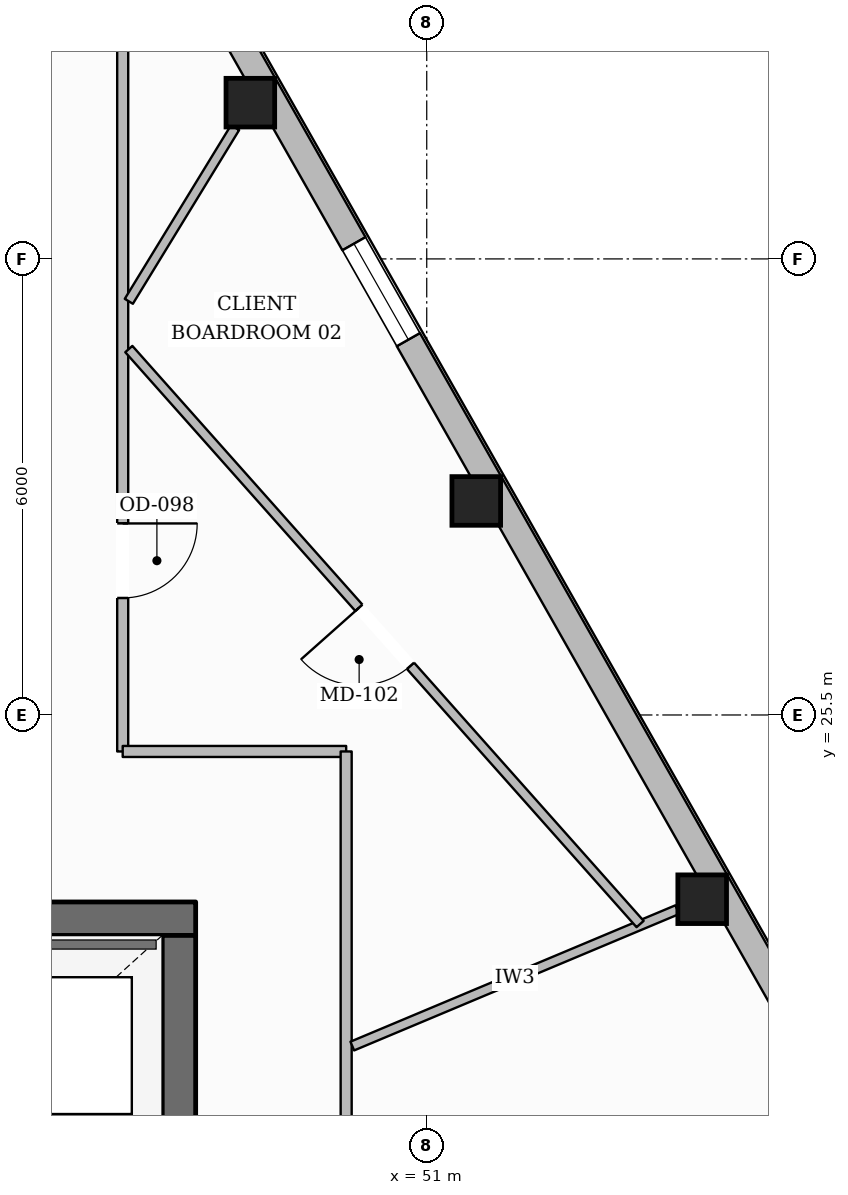
"""IFC4 building model, lengths in metres.
Left out: names, types, materials, properties, quantities, classifications, styles, units other than length and angle.
Written with IfcOpenShell. Run it as: python <this file> out.ifc"""

import sys

from ifc_helpers import new_model, si_unit, direction, frame, frame_2d, origin, origin_2d, place, context, subcontext, project, spatial, rectangle, hollow_rectangle, extrude, element, fill, save


model = new_model("IFC4")
c1 = context("Model", 3, precision=1e-05, world=origin(), true_north=direction((0.0, 1.0)))
c2 = subcontext(c1, "Body", "Model", "MODEL_VIEW")
j1 = project(units=[si_unit("LENGTHUNIT", "METRE"), si_unit("PLANEANGLEUNIT", "RADIAN")], contexts=[c1])
p1 = place(None, origin())
s1 = spatial("IfcSite", under=j1, at=p1, CompositionType="ELEMENT")
p2 = place(p1, origin())
s2 = spatial("IfcBuilding", under=s1, at=p2, CompositionType="ELEMENT")
p3 = place(p2, frame((0.0, 0.0, 165.0)))
s3 = spatial("IfcBuildingStorey", under=s2, at=p3, CompositionType="ELEMENT", Elevation=165.0)
p4 = place(p3, frame((28.04, 22.82, 0.0), z_axis=(0.0, 0.0, 1.0), x_axis=(1.0, 0.0, 0.0)))
e1 = element("IfcWall", 1, at=p4, inside=s3, PredefinedType="SOLIDWALL", context=c2, shape_type="SweptSolid", body=[
    extrude(rectangle(XDim=19.92, YDim=0.44, at=frame_2d((9.96, 0.0))), origin(), (0.0, 0.0, 1.0), 3.6),
])
p5 = place(p4, frame((6.235, 0.0, 0.0)))
e2 = element("IfcOpeningElement", 2, at=p5, cuts=e1, PredefinedType="OPENING", context=c2, shape_type="SweptSolid", body=[
    extrude(rectangle(XDim=1.05, YDim=2.15, at=frame_2d((0.525, 1.075))), frame((0.0, 0.23, 0.0), z_axis=(0.0, -1.0, 0.0), x_axis=(1.0, 0.0, 0.0)), (0.0, 0.0, 1.0), 0.46),
])
p6 = place(p4, frame((12.635, 0.0, 0.0)))
e3 = element("IfcOpeningElement", 3, at=p6, cuts=e1, PredefinedType="OPENING", context=c2, shape_type="SweptSolid", body=[
    extrude(rectangle(XDim=1.05, YDim=2.15, at=frame_2d((0.525, 1.075))), frame((0.0, 0.23, 0.0), z_axis=(0.0, -1.0, 0.0), x_axis=(1.0, 0.0, 0.0)), (0.0, 0.0, 1.0), 0.46),
])
p7 = place(p3, frame((47.74, 9.6, 0.0), z_axis=(0.0, 0.0, 1.0), x_axis=(0.0, 1.0, 0.0)))
e4 = element("IfcWall", 4, at=p7, inside=s3, PredefinedType="SOLIDWALL", context=c2, shape_type="SweptSolid", body=[
    extrude(rectangle(XDim=13.0, YDim=0.44, at=frame_2d((6.5, 0.0))), origin(), (0.0, 0.0, 1.0), 3.6),
])
p8 = place(p7, frame((0.2, 0.0, 0.0)))
e5 = element("IfcOpeningElement", 5, at=p8, cuts=e4, PredefinedType="OPENING", context=c2, shape_type="SweptSolid", body=[
    extrude(rectangle(XDim=1.1, YDim=2.15, at=frame_2d((0.55, 1.075))), frame((0.0, 0.23, 0.0), z_axis=(0.0, -1.0, 0.0), x_axis=(1.0, 0.0, 0.0)), (0.0, 0.0, 1.0), 0.46),
])
p9 = place(p7, frame((8.4, 0.0, 0.0)))
e6 = element("IfcOpeningElement", 6, at=p9, cuts=e4, PredefinedType="OPENING", context=c2, shape_type="SweptSolid", body=[
    extrude(rectangle(XDim=0.9, YDim=2.1, at=frame_2d((0.45, 1.05))), frame((0.0, 0.23, 0.0), z_axis=(0.0, -1.0, 0.0), x_axis=(1.0, 0.0, 0.0)), (0.0, 0.0, 1.0), 0.46),
])
for number, where, z_axis, x_axis in (
    (7, (54.624, 23.076, 0.0), (0.0, 0.0, 1.0), (1.0, 0.0, 0.0)),
    (8, (51.652, 28.316, 0.0), (0.0, 0.0, 1.0), (1.0, 0.0, 0.0)),
    (9, (48.679, 33.556, 0.0), (0.0, 0.0, 1.0), (1.0, 0.0, 0.0)),
):
    element("IfcColumn", number, at=place(p3, frame(where, z_axis=z_axis, x_axis=x_axis)), inside=s3, PredefinedType="COLUMN", context=c2, shape_type="SweptSolid", body=[
        extrude(hollow_rectangle(XDim=0.64, YDim=0.64, WallThickness=0.028, at=origin_2d()), origin(), (0.0, 0.0, 1.0), 3.6),
    ])
p10 = place(p3, frame((42.733, 44.585, 0.0), z_axis=(0.0, 0.0, 1.0), x_axis=(0.493387150796, -0.869809817966, 0.0)))
e10 = element("IfcWall", 10, at=p10, inside=s3, PredefinedType="STANDARD", context=c2, shape_type="SweptSolid", body=[
    extrude(rectangle(XDim=37.096, YDim=0.35, at=frame_2d((18.548, 0.0))), origin(), (0.0, 0.0, 1.0), 3.132),
])
p11 = place(p10, frame((32.886, 0.0, 0.65)))
e11 = element("IfcOpeningElement", 11, at=p11, cuts=e10, PredefinedType="OPENING", context=c2, shape_type="SweptSolid", body=[
    extrude(rectangle(XDim=1.45, YDim=1.75, at=frame_2d((0.725, 0.875))), frame((0.0, 0.185, 0.0), z_axis=(0.0, -1.0, 0.0), x_axis=(1.0, 0.0, 0.0)), (0.0, 0.0, 1.0), 0.37),
])
p12 = place(p10, frame((26.863, 0.0, 0.65)))
e12 = element("IfcOpeningElement", 12, at=p12, cuts=e10, PredefinedType="OPENING", context=c2, shape_type="SweptSolid", body=[
    extrude(rectangle(XDim=1.45, YDim=1.75, at=frame_2d((0.725, 0.875))), frame((0.0, 0.185, 0.0), z_axis=(0.0, -1.0, 0.0), x_axis=(1.0, 0.0, 0.0)), (0.0, 0.0, 1.0), 0.37),
])
p13 = place(p10, frame((14.814, 0.0, 0.65)))
e13 = element("IfcOpeningElement", 13, at=p13, cuts=e10, PredefinedType="OPENING", context=c2, shape_type="SweptSolid", body=[
    extrude(rectangle(XDim=1.45, YDim=1.75, at=frame_2d((0.725, 0.875))), frame((0.0, 0.185, 0.0), z_axis=(0.0, -1.0, 0.0), x_axis=(1.0, 0.0, 0.0)), (0.0, 0.0, 1.0), 0.37),
])
p14 = place(p10, frame((8.791, 0.0, 0.65)))
e14 = element("IfcOpeningElement", 14, at=p14, cuts=e10, PredefinedType="OPENING", context=c2, shape_type="SweptSolid", body=[
    extrude(rectangle(XDim=1.45, YDim=1.75, at=frame_2d((0.725, 0.875))), frame((0.0, 0.185, 0.0), z_axis=(0.0, -1.0, 0.0), x_axis=(1.0, 0.0, 0.0)), (0.0, 0.0, 1.0), 0.37),
])
p15 = place(p10, frame((2.767, 0.0, 0.65)))
e15 = element("IfcOpeningElement", 15, at=p15, cuts=e10, PredefinedType="OPENING", context=c2, shape_type="SweptSolid", body=[
    extrude(rectangle(XDim=1.45, YDim=1.75, at=frame_2d((0.725, 0.875))), frame((0.0, 0.185, 0.0), z_axis=(0.0, -1.0, 0.0), x_axis=(1.0, 0.0, 0.0)), (0.0, 0.0, 1.0), 0.37),
])
p16 = place(p3, frame((47.0, 34.387, 0.0), z_axis=(0.0, 0.0, 1.0), x_axis=(0.0, -1.0, 0.0)))
e16 = element("IfcWall", 16, at=p16, inside=s3, PredefinedType="PARTITIONING", context=c2, shape_type="SweptSolid", body=[
    extrude(rectangle(XDim=9.367, YDim=0.145, at=frame_2d((4.684, 0.0))), origin(), (0.0, 0.0, 1.0), 3.6),
])
p17 = place(p16, frame((6.367, 0.0, 0.0)))
e17 = element("IfcOpeningElement", 17, at=p17, cuts=e16, PredefinedType="OPENING", context=c2, shape_type="SweptSolid", body=[
    extrude(rectangle(XDim=0.98, YDim=2.15, at=frame_2d((0.49, 1.075))), frame((0.0, 0.083, 0.0), z_axis=(0.0, -1.0, 0.0), x_axis=(1.0, 0.0, 0.0)), (0.0, 0.0, 1.0), 0.165),
])
p18 = place(p3, frame((47.0, 25.02, 0.0), z_axis=(0.0, 0.0, 1.0), x_axis=(1.0, 0.0, 0.0)))
e18 = element("IfcWall", 18, at=p18, inside=s3, PredefinedType="PARTITIONING", context=c2, shape_type="SweptSolid", body=[
    extrude(rectangle(XDim=2.94, YDim=0.145, at=frame_2d((1.47, 0.0))), origin(), (0.0, 0.0, 1.0), 3.6),
])
p19 = place(p3, frame((49.94, 25.02, 0.0), z_axis=(0.0, 0.0, 1.0), x_axis=(0.0, -1.0, 0.0)))
e19 = element("IfcWall", 19, at=p19, inside=s3, PredefinedType="PARTITIONING", context=c2, shape_type="SweptSolid", body=[
    extrude(rectangle(XDim=7.92, YDim=0.145, at=frame_2d((3.96, 0.0))), origin(), (0.0, 0.0, 1.0), 3.339),
])
p20 = place(p3, frame((50.021, 21.144, 0.0), z_axis=(0.0, 0.0, 1.0), x_axis=(0.922095611861, 0.38696212035, 0.0)))
e20 = element("IfcWall", 20, at=p20, inside=s3, PredefinedType="PARTITIONING", context=c2, shape_type="SweptSolid", body=[
    extrude(rectangle(XDim=4.637, YDim=0.125, at=frame_2d((2.318, 0.0))), origin(), (0.0, 0.0, 1.0), 3.6),
])
p21 = place(p3, frame((47.081, 30.942, 0.0), z_axis=(0.0, 0.0, 1.0), x_axis=(0.52187383072, 0.85302268716, 0.0)))
e21 = element("IfcWall", 21, at=p21, inside=s3, PredefinedType="PARTITIONING", context=c2, shape_type="SweptSolid", body=[
    extrude(rectangle(XDim=2.679, YDim=0.125, at=frame_2d((1.34, 0.0))), origin(), (0.0, 0.0, 1.0), 3.6),
])
p22 = place(p3, frame((53.807, 22.75, 0.0), z_axis=(0.0, 0.0, 1.0), x_axis=(-0.664519515039, 0.747270910803, 0.0)))
e22 = element("IfcWall", 22, at=p22, inside=s3, PredefinedType="PARTITIONING", context=c2, shape_type="SweptSolid", body=[
    extrude(rectangle(XDim=10.123, YDim=0.125, at=frame_2d((5.061, 0.0))), origin(), (0.0, 0.0, 1.0), 3.339),
])
p23 = place(p22, frame((4.547, 0.0, 0.0)))
e23 = element("IfcOpeningElement", 23, at=p23, cuts=e22, PredefinedType="OPENING", context=c2, shape_type="SweptSolid", body=[
    extrude(rectangle(XDim=1.02, YDim=2.15, at=frame_2d((0.51, 1.075))), frame((0.0, 0.073, 0.0), z_axis=(0.0, -1.0, 0.0), x_axis=(1.0, 0.0, 0.0)), (0.0, 0.0, 1.0), 0.145),
])
p24 = place(p13, origin())
e24 = element("IfcWindow", 24, at=p24, inside=s3, PartitioningType="SINGLE_PANEL", PredefinedType="WINDOW", context=c2, shape_type="SweptSolid", body=[
    extrude(rectangle(XDim=1.45, YDim=1.75, at=frame_2d((0.725, 0.875))), frame((0.0, 0.03, 0.0), z_axis=(0.0, -1.0, 0.0), x_axis=(1.0, 0.0, 0.0)), (0.0, 0.0, 1.0), 0.06),
])
fill(e13, e24)
p25 = place(p17, origin())
e25 = element("IfcDoor", 25, at=p25, inside=s3, OperationType="SINGLE_SWING_LEFT", PredefinedType="DOOR", context=c2, shape_type="SweptSolid", body=[
    extrude(rectangle(XDim=0.98, YDim=2.15, at=frame_2d((0.49, 1.075))), frame((0.0, 0.025, 0.0), z_axis=(0.0, -1.0, 0.0), x_axis=(1.0, 0.0, 0.0)), (0.0, 0.0, 1.0), 0.05),
])
fill(e17, e25)
p26 = place(p23, origin())
e26 = element("IfcDoor", 26, at=p26, inside=s3, OperationType="SINGLE_SWING_RIGHT", PredefinedType="DOOR", context=c2, shape_type="SweptSolid", body=[
    extrude(rectangle(XDim=1.02, YDim=2.15, at=frame_2d((0.51, 1.075))), frame((0.0, 0.025, 0.0), z_axis=(0.0, -1.0, 0.0), x_axis=(1.0, 0.0, 0.0)), (0.0, 0.0, 1.0), 0.05),
])
fill(e23, e26)
save(model, sys.argv[1])
